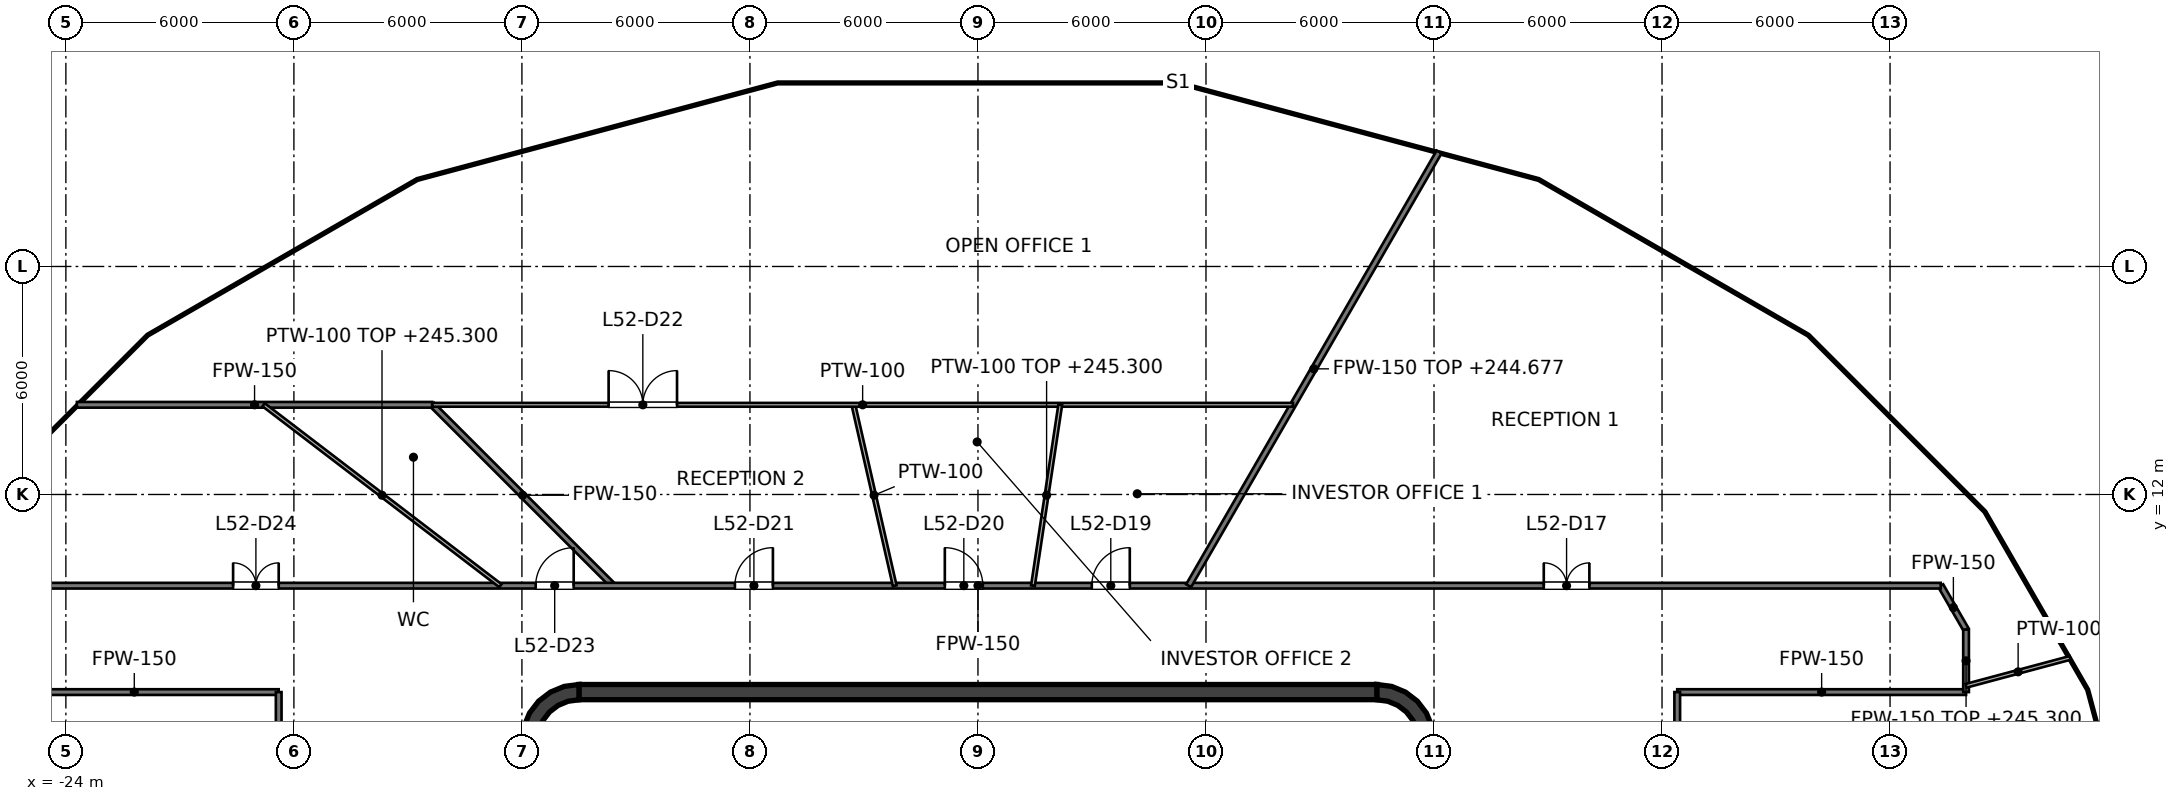
"""IFC4 building model, lengths in metres.
Left out: names, types, materials, properties, quantities, classifications, styles, units other than length and angle.
Written with IfcOpenShell. Run it as: python <this file> out.ifc"""

import sys

from ifc_helpers import new_model, si_unit, direction, frame, frame_2d, origin, place, context, subcontext, project, spatial, polyline, rectangle, outline, extrude, element, fill, save


model = new_model("IFC4")
c1 = context("Model", 3, precision=1e-05, world=origin(), true_north=direction((0.0, 1.0)))
c2 = subcontext(c1, "Body", "Model", "MODEL_VIEW")
j1 = project(units=[si_unit("LENGTHUNIT", "METRE"), si_unit("PLANEANGLEUNIT", "RADIAN")], contexts=[c1])
p1 = place(None, origin())
s1 = spatial("IfcSite", under=j1, at=p1, CompositionType="ELEMENT")
p2 = place(p1, origin())
s2 = spatial("IfcBuilding", under=s1, at=p2, CompositionType="ELEMENT")
p3 = place(p2, frame((0.0, 0.0, 241.6)))
s3 = spatial("IfcBuildingStorey", under=s2, at=p3, CompositionType="ELEMENT", Elevation=241.6)
p4 = place(p3, frame((-10.5, 6.8, 0.0), z_axis=(0.0, 0.0, 1.0), x_axis=(1.0, 0.0, 0.0)))
e1 = element("IfcWall", 1, at=p4, inside=s3, PredefinedType="SHEAR", context=c2, shape_type="SweptSolid", body=[
    extrude(rectangle(XDim=21.0, YDim=0.4, at=frame_2d((10.5, 0.0))), origin(), (0.0, 0.0, 1.0), 4.0),
])
p5 = place(p3, origin())
e2 = element("IfcWall", 2, at=p5, inside=s3, PredefinedType="SHEAR", context=c2, shape_type="SweptSolid", body=[
    extrude(outline(polyline([(10.5, 7.0), (10.5, 6.596), (10.784, 6.559), (11.048, 6.45), (11.275, 6.275), (11.45, 6.048), (11.559, 5.784), (11.596, 5.5), (12.0, 5.5), (11.949, 5.888), (11.799, 6.25), (11.561, 6.561), (11.25, 6.799), (10.888, 6.949), (10.5, 7.0)])), origin(), (0.0, 0.0, 1.0), 4.0),
])
e3 = element("IfcWall", 3, at=p5, inside=s3, PredefinedType="SHEAR", context=c2, shape_type="SweptSolid", body=[
    extrude(outline(polyline([(-12.0, 5.5), (-11.596, 5.5), (-11.559, 5.784), (-11.45, 6.048), (-11.275, 6.275), (-11.048, 6.45), (-10.784, 6.559), (-10.5, 6.596), (-10.5, 7.0), (-10.888, 6.949), (-11.25, 6.799), (-11.561, 6.561), (-11.799, 6.25), (-11.949, 5.888), (-12.0, 5.5)])), origin(), (0.0, 0.0, 1.0), 4.0),
])
p6 = place(p3, frame((-9.0, 4.1, 0.0), z_axis=(0.0, 0.0, 1.0), x_axis=(0.0, 1.0, 0.0)))
e4 = element("IfcWall", 4, at=p6, inside=s3, PredefinedType="SOLIDWALL", context=c2, shape_type="SweptSolid", body=[
    extrude(rectangle(XDim=2.5, YDim=0.25, at=frame_2d((1.25, 0.0))), origin(), (0.0, 0.0, 1.0), 3.85),
])
p7 = place(p6, frame((0.65, 0.0, 0.0)))
e5 = element("IfcOpeningElement", 5, at=p7, cuts=e4, PredefinedType="OPENING", context=c2, shape_type="SweptSolid", body=[
    extrude(rectangle(XDim=1.2, YDim=2.1, at=frame_2d((0.6, 1.05))), frame((0.0, 0.125, 0.0), z_axis=(0.0, -1.0, 0.0), x_axis=(1.0, 0.0, 0.0)), (0.0, 0.0, 1.0), 0.25),
])
p8 = place(p3, frame((9.0, 4.1, 0.0), z_axis=(0.0, 0.0, 1.0), x_axis=(0.0, 1.0, 0.0)))
e6 = element("IfcWall", 6, at=p8, inside=s3, PredefinedType="SOLIDWALL", context=c2, shape_type="SweptSolid", body=[
    extrude(rectangle(XDim=2.5, YDim=0.25, at=frame_2d((1.25, 0.0))), origin(), (0.0, 0.0, 1.0), 3.85),
])
p9 = place(p8, frame((0.65, 0.0, 0.0)))
e7 = element("IfcOpeningElement", 7, at=p9, cuts=e6, PredefinedType="OPENING", context=c2, shape_type="SweptSolid", body=[
    extrude(rectangle(XDim=1.2, YDim=2.1, at=frame_2d((0.6, 1.05))), frame((0.0, 0.125, 0.0), z_axis=(0.0, -1.0, 0.0), x_axis=(1.0, 0.0, 0.0)), (0.0, 0.0, 1.0), 0.25),
])
for number, where, z_axis, x_axis in (
    (8, (-3.15, 4.1, 0.0), (0.0, 0.0, 1.0), (0.0, 1.0, 0.0)),
    (9, (3.15, 4.1, 0.0), (0.0, 0.0, 1.0), (0.0, 1.0, 0.0)),
):
    element("IfcWall", number, at=place(p3, frame(where, z_axis=z_axis, x_axis=x_axis)), inside=s3, PredefinedType="SOLIDWALL", context=c2, shape_type="SweptSolid", body=[
        extrude(rectangle(XDim=2.5, YDim=0.25, at=frame_2d((1.25, 0.0))), origin(), (0.0, 0.0, 1.0), 3.85),
    ])
p10 = place(p3, frame((25.333, 9.6, 0.0), z_axis=(0.0, 0.0, 1.0), x_axis=(0.500076310463, -0.865981341435, 0.0)))
e10 = element("IfcWall", 10, at=p10, inside=s3, PredefinedType="PARTITIONING", context=c2, shape_type="SweptSolid", body=[
    extrude(rectangle(XDim=1.334, YDim=0.15, at=frame_2d((0.667, 0.0))), origin(), (0.0, 0.0, 1.0), 2.768),
])
p11 = place(p3, frame((-14.36, 14.36, 0.0), z_axis=(0.0, 0.0, 1.0), x_axis=(0.707106781187, -0.707106781187, 0.0)))
e11 = element("IfcWall", 11, at=p11, inside=s3, PredefinedType="PARTITIONING", context=c2, shape_type="SweptSolid", body=[
    extrude(rectangle(XDim=6.732, YDim=0.15, at=frame_2d((3.366, 0.0))), origin(), (0.0, 0.0, 1.0), 2.768),
])
for number, where, z_axis, x_axis in (
    (12, (-26.0, 6.8, 0.0), (0.0, 0.0, 1.0), (1.0, 0.0, 0.0)),
    (13, (18.4, 6.8, 0.0), (0.0, 0.0, 1.0), (1.0, 0.0, 0.0)),
):
    element("IfcWall", number, at=place(p3, frame(where, z_axis=z_axis, x_axis=x_axis)), inside=s3, PredefinedType="PARTITIONING", context=c2, shape_type="SweptSolid", body=[
        extrude(rectangle(XDim=7.6, YDim=0.15, at=frame_2d((3.8, 0.0))), origin(), (0.0, 0.0, 1.0), 2.768),
    ])
p12 = place(p3, frame((-25.333, 9.6, 0.0), z_axis=(0.0, 0.0, 1.0), x_axis=(1.0, 0.0, 0.0)))
e14 = element("IfcWall", 14, at=p12, inside=s3, PredefinedType="PARTITIONING", context=c2, shape_type="SweptSolid", body=[
    extrude(rectangle(XDim=50.666, YDim=0.15, at=frame_2d((25.333, 0.0))), origin(), (0.0, 0.0, 1.0), 2.768),
])
p13 = place(p12, frame((40.221, 0.0, 0.0)))
e15 = element("IfcOpeningElement", 15, at=p13, cuts=e14, PredefinedType="OPENING", context=c2, shape_type="SweptSolid", body=[
    extrude(rectangle(XDim=1.2, YDim=2.1, at=frame_2d((0.6, 1.05))), frame((0.0, 0.075, 0.0), z_axis=(0.0, -1.0, 0.0), x_axis=(1.0, 0.0, 0.0)), (0.0, 0.0, 1.0), 0.15),
])
p14 = place(p12, frame((28.328, 0.0, 0.0)))
e16 = element("IfcOpeningElement", 16, at=p14, cuts=e14, PredefinedType="OPENING", context=c2, shape_type="SweptSolid", body=[
    extrude(rectangle(XDim=1.0, YDim=2.1, at=frame_2d((0.5, 1.05))), frame((0.0, 0.075, 0.0), z_axis=(0.0, -1.0, 0.0), x_axis=(1.0, 0.0, 0.0)), (0.0, 0.0, 1.0), 0.15),
])
p15 = place(p12, frame((24.461, 0.0, 0.0)))
e17 = element("IfcOpeningElement", 17, at=p15, cuts=e14, PredefinedType="OPENING", context=c2, shape_type="SweptSolid", body=[
    extrude(rectangle(XDim=1.0, YDim=2.1, at=frame_2d((0.5, 1.05))), frame((0.0, 0.075, 0.0), z_axis=(0.0, -1.0, 0.0), x_axis=(1.0, 0.0, 0.0)), (0.0, 0.0, 1.0), 0.15),
])
p16 = place(p12, frame((18.938, 0.0, 0.0)))
e18 = element("IfcOpeningElement", 18, at=p16, cuts=e14, PredefinedType="OPENING", context=c2, shape_type="SweptSolid", body=[
    extrude(rectangle(XDim=1.0, YDim=2.1, at=frame_2d((0.5, 1.05))), frame((0.0, 0.075, 0.0), z_axis=(0.0, -1.0, 0.0), x_axis=(1.0, 0.0, 0.0)), (0.0, 0.0, 1.0), 0.15),
])
p17 = place(p12, frame((13.695, 0.0, 0.0)))
e19 = element("IfcOpeningElement", 19, at=p17, cuts=e14, PredefinedType="OPENING", context=c2, shape_type="SweptSolid", body=[
    extrude(rectangle(XDim=1.0, YDim=2.1, at=frame_2d((0.5, 1.05))), frame((0.0, 0.075, 0.0), z_axis=(0.0, -1.0, 0.0), x_axis=(1.0, 0.0, 0.0)), (0.0, 0.0, 1.0), 0.15),
])
p18 = place(p12, frame((5.733, 0.0, 0.0)))
e20 = element("IfcOpeningElement", 20, at=p18, cuts=e14, PredefinedType="OPENING", context=c2, shape_type="SweptSolid", body=[
    extrude(rectangle(XDim=1.2, YDim=2.1, at=frame_2d((0.6, 1.05))), frame((0.0, 0.075, 0.0), z_axis=(0.0, -1.0, 0.0), x_axis=(1.0, 0.0, 0.0)), (0.0, 0.0, 1.0), 0.15),
])
p19 = place(p3, frame((-23.71, 14.36, 0.0), z_axis=(0.0, 0.0, 1.0), x_axis=(1.0, 0.0, 0.0)))
e21 = element("IfcWall", 21, at=p19, inside=s3, PredefinedType="PARTITIONING", context=c2, shape_type="SweptSolid", body=[
    extrude(rectangle(XDim=9.35, YDim=0.15, at=frame_2d((4.675, 0.0))), origin(), (0.0, 0.0, 1.0), 2.768),
])
p20 = place(p3, frame((5.543, 9.6, 0.0), z_axis=(0.0, 0.0, 1.0), x_axis=(0.500044242988, 0.865999858577, 0.0)))
e22 = element("IfcWall", 22, at=p20, inside=s3, PredefinedType="PARTITIONING", context=c2, shape_type="SweptSolid", body=[
    extrude(rectangle(XDim=13.178, YDim=0.15, at=frame_2d((6.589, 0.0))), origin(), (0.0, 0.0, 1.0), 3.077),
])
p21 = place(p3, frame((26.0, 6.8, 0.0), z_axis=(0.0, 0.0, 1.0), x_axis=(0.0, 1.0, 0.0)))
e23 = element("IfcWall", 23, at=p21, inside=s3, PredefinedType="PARTITIONING", context=c2, shape_type="SweptSolid", body=[
    extrude(rectangle(XDim=1.645, YDim=0.15, at=frame_2d((0.823, 0.0))), origin(), (0.0, 0.0, 1.0), 3.7),
])
p22 = place(p3, frame((18.4, -6.8, 0.0), z_axis=(0.0, 0.0, 1.0), x_axis=(0.0, 1.0, 0.0)))
e24 = element("IfcWall", 24, at=p22, inside=s3, PredefinedType="PARTITIONING", context=c2, shape_type="SweptSolid", body=[
    extrude(rectangle(XDim=13.6, YDim=0.15, at=frame_2d((6.8, 0.0))), origin(), (0.0, 0.0, 1.0), 2.768),
])
p23 = place(p22, frame((6.2, 0.0, 0.0)))
e25 = element("IfcOpeningElement", 25, at=p23, cuts=e24, PredefinedType="OPENING", context=c2, shape_type="SweptSolid", body=[
    extrude(rectangle(XDim=1.2, YDim=2.1, at=frame_2d((0.6, 1.05))), frame((0.0, 0.075, 0.0), z_axis=(0.0, -1.0, 0.0), x_axis=(1.0, 0.0, 0.0)), (0.0, 0.0, 1.0), 0.15),
])
p24 = place(p3, frame((-18.4, -6.8, 0.0), z_axis=(0.0, 0.0, 1.0), x_axis=(0.0, 1.0, 0.0)))
e26 = element("IfcWall", 26, at=p24, inside=s3, PredefinedType="PARTITIONING", context=c2, shape_type="SweptSolid", body=[
    extrude(rectangle(XDim=13.6, YDim=0.15, at=frame_2d((6.8, 0.0))), origin(), (0.0, 0.0, 1.0), 2.768),
])
p25 = place(p3, frame((-3.277, 14.36, 0.0), z_axis=(0.0, 0.0, 1.0), x_axis=(0.222470409815, -0.97493944261, 0.0)))
e27 = element("IfcWall", 27, at=p25, inside=s3, PredefinedType="PARTITIONING", context=c2, shape_type="SweptSolid", body=[
    extrude(rectangle(XDim=4.882, YDim=0.1, at=frame_2d((2.441, 0.0))), origin(), (0.0, 0.0, 1.0), 2.768),
])
p26 = place(p3, frame((-18.797, 14.36, 0.0), z_axis=(0.0, 0.0, 1.0), x_axis=(0.794667043869, -0.607045541445, 0.0)))
e28 = element("IfcWall", 28, at=p26, inside=s3, PredefinedType="PARTITIONING", context=c2, shape_type="SweptSolid", body=[
    extrude(rectangle(XDim=7.841, YDim=0.1, at=frame_2d((3.921, 0.0))), origin(), (0.0, 0.0, 1.0), 3.7),
])
p27 = place(p3, frame((-14.36, 14.36, 0.0), z_axis=(0.0, 0.0, 1.0), x_axis=(1.0, 0.0, 0.0)))
e29 = element("IfcWall", 29, at=p27, inside=s3, PredefinedType="PARTITIONING", context=c2, shape_type="SweptSolid", body=[
    extrude(rectangle(XDim=22.651, YDim=0.1, at=frame_2d((11.326, 0.0))), origin(), (0.0, 0.0, 1.0), 2.768),
])
p28 = place(p27, frame((4.642, 0.0, 0.0)))
e30 = element("IfcOpeningElement", 30, at=p28, cuts=e29, PredefinedType="OPENING", context=c2, shape_type="SweptSolid", body=[
    extrude(rectangle(XDim=1.8, YDim=2.1, at=frame_2d((0.9, 1.05))), frame((0.0, 0.05, 0.0), z_axis=(0.0, -1.0, 0.0), x_axis=(1.0, 0.0, 0.0)), (0.0, 0.0, 1.0), 0.1),
])
p29 = place(p3, frame((26.0, 6.966, 0.0), z_axis=(0.0, 0.0, 1.0), x_axis=(0.965951508514, 0.258723178704, 0.0)))
e31 = element("IfcWall", 31, at=p29, inside=s3, PredefinedType="PARTITIONING", context=c2, shape_type="SweptSolid", body=[
    extrude(rectangle(XDim=2.837, YDim=0.1, at=frame_2d((1.418, 0.0))), origin(), (0.0, 0.0, 1.0), 3.325),
])
p30 = place(p3, frame((1.447, 9.6, 0.0), z_axis=(0.0, 0.0, 1.0), x_axis=(0.149156325557, 0.988813627812, 0.0)))
e32 = element("IfcWall", 32, at=p30, inside=s3, PredefinedType="PARTITIONING", context=c2, shape_type="SweptSolid", body=[
    extrude(rectangle(XDim=4.814, YDim=0.1, at=frame_2d((2.407, 0.0))), origin(), (0.0, 0.0, 1.0), 3.7),
])
p31 = place(p13, origin())
e33 = element("IfcDoor", 33, at=p31, inside=s3, OperationType="DOUBLE_DOOR_SINGLE_SWING", PredefinedType="DOOR", context=c2, shape_type="SweptSolid", body=[
    extrude(rectangle(XDim=1.2, YDim=2.1, at=frame_2d((0.6, 1.05))), frame((0.0, 0.025, 0.0), z_axis=(0.0, -1.0, 0.0), x_axis=(1.0, 0.0, 0.0)), (0.0, 0.0, 1.0), 0.05),
])
fill(e15, e33)
p32 = place(p14, origin())
e34 = element("IfcDoor", 34, at=p32, inside=s3, OperationType="SINGLE_SWING_RIGHT", PredefinedType="DOOR", context=c2, shape_type="SweptSolid", body=[
    extrude(rectangle(XDim=1.0, YDim=2.1, at=frame_2d((0.5, 1.05))), frame((0.0, 0.025, 0.0), z_axis=(0.0, -1.0, 0.0), x_axis=(1.0, 0.0, 0.0)), (0.0, 0.0, 1.0), 0.05),
])
fill(e16, e34)
p33 = place(p15, origin())
e35 = element("IfcDoor", 35, at=p33, inside=s3, OperationType="SINGLE_SWING_LEFT", PredefinedType="DOOR", context=c2, shape_type="SweptSolid", body=[
    extrude(rectangle(XDim=1.0, YDim=2.1, at=frame_2d((0.5, 1.05))), frame((0.0, 0.025, 0.0), z_axis=(0.0, -1.0, 0.0), x_axis=(1.0, 0.0, 0.0)), (0.0, 0.0, 1.0), 0.05),
])
fill(e17, e35)
p34 = place(p16, origin())
e36 = element("IfcDoor", 36, at=p34, inside=s3, OperationType="SINGLE_SWING_RIGHT", PredefinedType="DOOR", context=c2, shape_type="SweptSolid", body=[
    extrude(rectangle(XDim=1.0, YDim=2.1, at=frame_2d((0.5, 1.05))), frame((0.0, 0.025, 0.0), z_axis=(0.0, -1.0, 0.0), x_axis=(1.0, 0.0, 0.0)), (0.0, 0.0, 1.0), 0.05),
])
fill(e18, e36)
p35 = place(p28, origin())
e37 = element("IfcDoor", 37, at=p35, inside=s3, OperationType="DOUBLE_DOOR_SINGLE_SWING", PredefinedType="DOOR", context=c2, shape_type="SweptSolid", body=[
    extrude(rectangle(XDim=1.8, YDim=2.1, at=frame_2d((0.9, 1.05))), frame((0.0, 0.025, 0.0), z_axis=(0.0, -1.0, 0.0), x_axis=(1.0, 0.0, 0.0)), (0.0, 0.0, 1.0), 0.05),
])
fill(e30, e37)
p36 = place(p17, origin())
e38 = element("IfcDoor", 38, at=p36, inside=s3, OperationType="SINGLE_SWING_RIGHT", PredefinedType="DOOR", context=c2, shape_type="SweptSolid", body=[
    extrude(rectangle(XDim=1.0, YDim=2.1, at=frame_2d((0.5, 1.05))), frame((0.0, 0.025, 0.0), z_axis=(0.0, -1.0, 0.0), x_axis=(1.0, 0.0, 0.0)), (0.0, 0.0, 1.0), 0.05),
])
fill(e19, e38)
p37 = place(p18, origin())
e39 = element("IfcDoor", 39, at=p37, inside=s3, OperationType="DOUBLE_DOOR_SINGLE_SWING", PredefinedType="DOOR", context=c2, shape_type="SweptSolid", body=[
    extrude(rectangle(XDim=1.2, YDim=2.1, at=frame_2d((0.6, 1.05))), frame((0.0, 0.025, 0.0), z_axis=(0.0, -1.0, 0.0), x_axis=(1.0, 0.0, 0.0)), (0.0, 0.0, 1.0), 0.05),
])
fill(e20, e39)
save(model, sys.argv[1])
